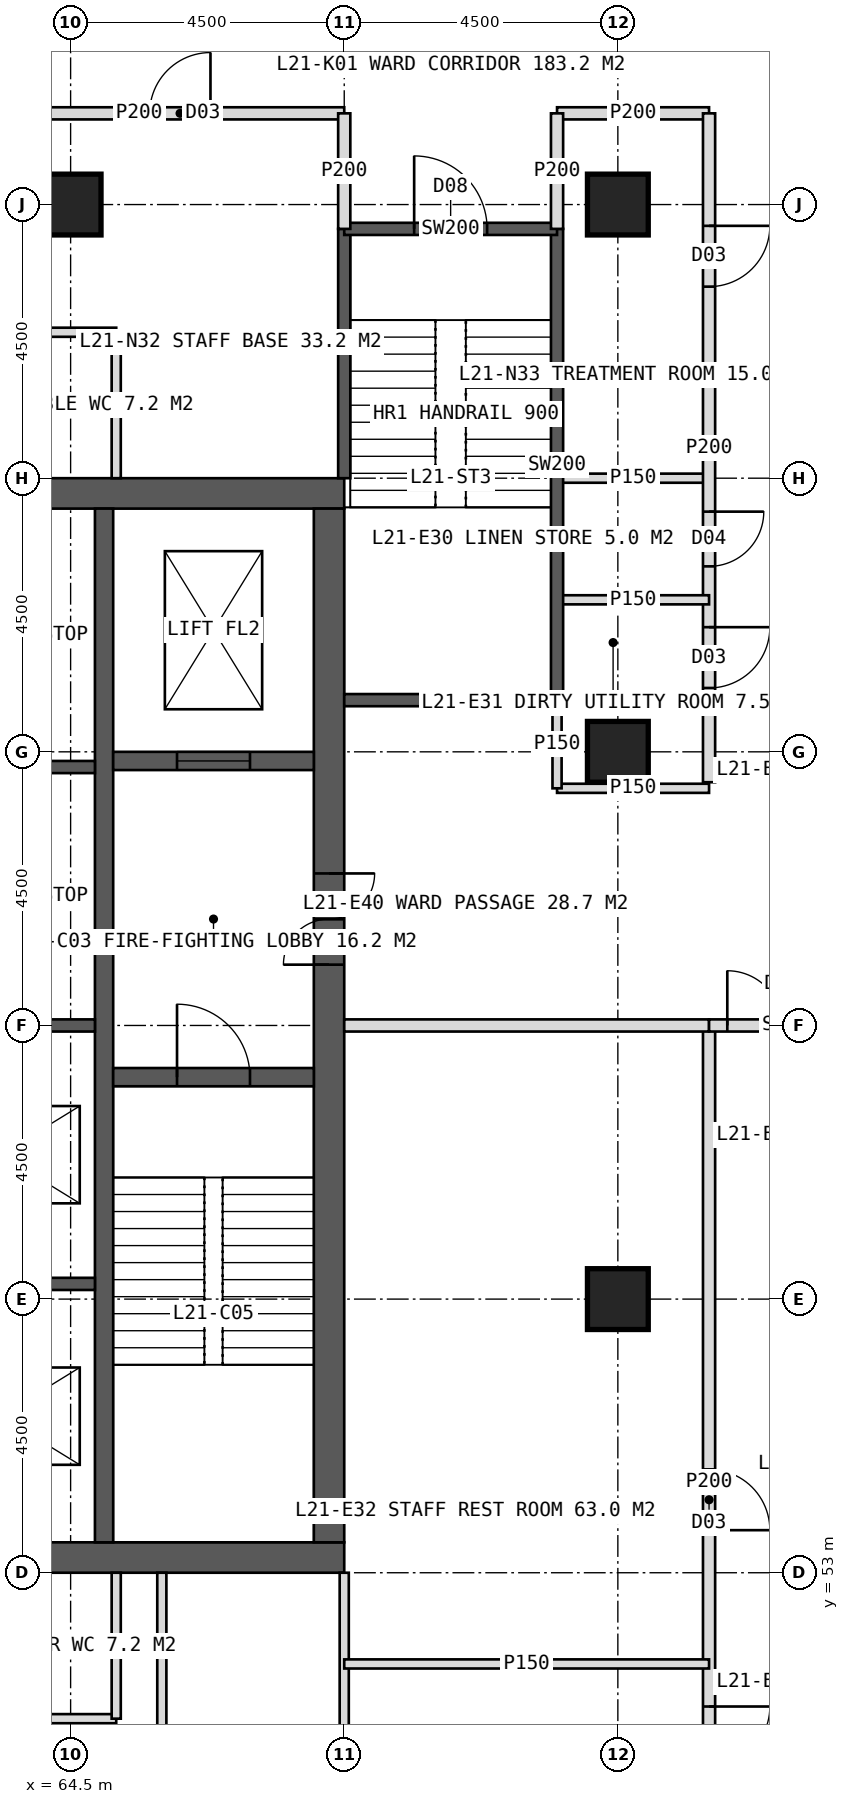
"""IFC4 building model, lengths in metres.
Left out: names, types, materials, properties, quantities, classifications, styles, units other than length and angle.
Written with IfcOpenShell. Run it as: python <this file> out.ifc"""

import sys

from ifc_helpers import new_model, si_unit, direction, frame, frame_2d, origin, origin_2d, place, context, subcontext, project, spatial, rectangle, hollow_rectangle, extrude, element, fill, save


model = new_model("IFC4")
c1 = context("Model", 3, precision=1e-05, world=origin(), true_north=direction((0.0, 1.0)))
c2 = subcontext(c1, "Body", "Model", "MODEL_VIEW")
j1 = project(units=[si_unit("LENGTHUNIT", "METRE"), si_unit("PLANEANGLEUNIT", "RADIAN")], contexts=[c1])
p1 = place(None, origin())
s1 = spatial("IfcSite", under=j1, at=p1, CompositionType="ELEMENT")
p2 = place(p1, origin())
s2 = spatial("IfcBuilding", under=s1, at=p2, CompositionType="ELEMENT")
p3 = place(p2, frame((0.0, 0.0, 91.0)))
s3 = spatial("IfcBuildingStorey", under=s2, at=p3, CompositionType="ELEMENT", Elevation=91.0)
p4 = place(p3, frame((51.0, 70.75, 0.0), z_axis=(0.0, 0.0, 1.0), x_axis=(1.0, 0.0, 0.0)))
e1 = element("IfcWall", 1, at=p4, inside=s3, PredefinedType="SHEAR", context=c2, shape_type="SweptSolid", body=[
    extrude(rectangle(XDim=18.0, YDim=0.5, at=frame_2d((9.0, 0.0))), origin(), (0.0, 0.0, 1.0), 4.0),
])
p5 = place(p4, frame((8.1, 0.0, 0.0)))
e2 = element("IfcOpeningElement", 2, at=p5, cuts=e1, PredefinedType="OPENING", context=c2, shape_type="SweptSolid", body=[
    extrude(rectangle(XDim=1.8, YDim=2.2, at=frame_2d((0.9, 1.1))), frame((0.0, 0.26, 0.0), z_axis=(0.0, -1.0, 0.0), x_axis=(1.0, 0.0, 0.0)), (0.0, 0.0, 1.0), 0.52),
])
p6 = place(p3, frame((51.0, 53.25, 0.0), z_axis=(0.0, 0.0, 1.0), x_axis=(1.0, 0.0, 0.0)))
e3 = element("IfcWall", 3, at=p6, inside=s3, PredefinedType="SHEAR", context=c2, shape_type="SweptSolid", body=[
    extrude(rectangle(XDim=18.0, YDim=0.5, at=frame_2d((9.0, 0.0))), origin(), (0.0, 0.0, 1.0), 4.0),
])
p7 = place(p6, frame((8.1, 0.0, 0.0)))
e4 = element("IfcOpeningElement", 4, at=p7, cuts=e3, PredefinedType="OPENING", context=c2, shape_type="SweptSolid", body=[
    extrude(rectangle(XDim=1.8, YDim=2.2, at=frame_2d((0.9, 1.1))), frame((0.0, 0.26, 0.0), z_axis=(0.0, -1.0, 0.0), x_axis=(1.0, 0.0, 0.0)), (0.0, 0.0, 1.0), 0.52),
])
p8 = place(p3, frame((68.75, 53.5, 0.0), z_axis=(0.0, 0.0, 1.0), x_axis=(0.0, 1.0, 0.0)))
e5 = element("IfcWall", 5, at=p8, inside=s3, PredefinedType="SHEAR", context=c2, shape_type="SweptSolid", body=[
    extrude(rectangle(XDim=17.0, YDim=0.5, at=frame_2d((8.5, 0.0))), origin(), (0.0, 0.0, 1.0), 4.0),
])
p9 = place(p8, frame((9.5, 0.0, 0.0)))
e6 = element("IfcOpeningElement", 6, at=p9, cuts=e5, PredefinedType="OPENING", context=c2, shape_type="SweptSolid", body=[
    extrude(rectangle(XDim=1.5, YDim=2.2, at=frame_2d((0.75, 1.1))), frame((0.0, 0.26, 0.0), z_axis=(0.0, -1.0, 0.0), x_axis=(1.0, 0.0, 0.0)), (0.0, 0.0, 1.0), 0.52),
])
p10 = place(p3, frame((65.05, 53.5, 0.0), z_axis=(0.0, 0.0, 1.0), x_axis=(0.0, 1.0, 0.0)))
e7 = element("IfcWall", 7, at=p10, inside=s3, PredefinedType="SHEAR", context=c2, shape_type="SweptSolid", body=[
    extrude(rectangle(XDim=17.0, YDim=0.3, at=frame_2d((8.5, 0.0))), origin(), (0.0, 0.0, 1.0), 4.0),
])
for number, where, z_axis, x_axis in (
    (8, (61.85, 57.75, 0.0), (0.0, 0.0, 1.0), (1.0, 0.0, 0.0)),
    (9, (61.85, 62.0, 0.0), (0.0, 0.0, 1.0), (1.0, 0.0, 0.0)),
    (10, (61.85, 66.25, 0.0), (0.0, 0.0, 1.0), (1.0, 0.0, 0.0)),
):
    element("IfcWall", number, at=place(p3, frame(where, z_axis=z_axis, x_axis=x_axis)), inside=s3, PredefinedType="SHEAR", context=c2, shape_type="SweptSolid", body=[
        extrude(rectangle(XDim=3.05, YDim=0.2, at=frame_2d((1.525, 0.0))), origin(), (0.0, 0.0, 1.0), 4.0),
    ])
p11 = place(p3, frame((65.2, 61.15, 0.0), z_axis=(0.0, 0.0, 1.0), x_axis=(1.0, 0.0, 0.0)))
e11 = element("IfcWall", 11, at=p11, inside=s3, PredefinedType="SHEAR", context=c2, shape_type="SweptSolid", body=[
    extrude(rectangle(XDim=3.3, YDim=0.3, at=frame_2d((1.65, 0.0))), origin(), (0.0, 0.0, 1.0), 4.0),
])
p12 = place(p11, frame((1.05, 0.0, 0.0)))
e12 = element("IfcOpeningElement", 12, at=p12, cuts=e11, PredefinedType="OPENING", context=c2, shape_type="SweptSolid", body=[
    extrude(rectangle(XDim=1.2, YDim=2.1, at=frame_2d((0.6, 1.05))), frame((0.0, 0.16, 0.0), z_axis=(0.0, -1.0, 0.0), x_axis=(1.0, 0.0, 0.0)), (0.0, 0.0, 1.0), 0.32),
])
p13 = place(p3, frame((65.2, 66.35, 0.0), z_axis=(0.0, 0.0, 1.0), x_axis=(1.0, 0.0, 0.0)))
e13 = element("IfcWall", 13, at=p13, inside=s3, PredefinedType="SHEAR", context=c2, shape_type="SweptSolid", body=[
    extrude(rectangle(XDim=3.3, YDim=0.3, at=frame_2d((1.65, 0.0))), origin(), (0.0, 0.0, 1.0), 4.0),
])
p14 = place(p13, frame((1.05, 0.0, 0.0)))
e14 = element("IfcOpeningElement", 14, at=p14, cuts=e13, PredefinedType="OPENING", context=c2, shape_type="SweptSolid", body=[
    extrude(rectangle(XDim=1.2, YDim=2.2, at=frame_2d((0.6, 1.1))), frame((0.0, 0.16, 0.0), z_axis=(0.0, -1.0, 0.0), x_axis=(1.0, 0.0, 0.0)), (0.0, 0.0, 1.0), 0.32),
])
for number, where, z_axis, x_axis in (
    (15, (73.5, 75.5, 0.0), (0.0, 0.0, 1.0), (1.0, 0.0, 0.0)),
    (16, (64.5, 75.5, 0.0), (0.0, 0.0, 1.0), (1.0, 0.0, 0.0)),
    (17, (73.5, 57.5, 0.0), (0.0, 0.0, 1.0), (1.0, 0.0, 0.0)),
    (18, (73.5, 66.5, 0.0), (0.0, 0.0, 1.0), (1.0, 0.0, 0.0)),
):
    element("IfcColumn", number, at=place(p3, frame(where, z_axis=z_axis, x_axis=x_axis)), inside=s3, PredefinedType="COLUMN", context=c2, shape_type="SweptSolid", body=[
        extrude(hollow_rectangle(XDim=1.0, YDim=1.0, WallThickness=0.1, at=origin_2d()), origin(), (0.0, 0.0, 1.0), 4.0),
    ])
p15 = place(p3, frame((62.25, 77.0, 0.0), z_axis=(0.0, 0.0, 1.0), x_axis=(1.0, 0.0, 0.0)))
e19 = element("IfcWall", 19, at=p15, inside=s3, PredefinedType="PARTITIONING", context=c2, shape_type="SweptSolid", body=[
    extrude(rectangle(XDim=6.75, YDim=0.2, at=frame_2d((3.375, 0.0))), origin(), (0.0, 0.0, 1.0), 3.75),
])
p16 = place(p15, frame((3.55, 0.0, 0.0)))
e20 = element("IfcOpeningElement", 20, at=p16, cuts=e19, PredefinedType="OPENING", context=c2, shape_type="SweptSolid", body=[
    extrude(rectangle(XDim=1.0, YDim=2.1, at=frame_2d((0.5, 1.05))), frame((0.0, 0.11, 0.0), z_axis=(0.0, -1.0, 0.0), x_axis=(1.0, 0.0, 0.0)), (0.0, 0.0, 1.0), 0.22),
])
p17 = place(p3, frame((72.5, 77.0, 0.0), z_axis=(0.0, 0.0, 1.0), x_axis=(1.0, 0.0, 0.0)))
e21 = element("IfcWall", 21, at=p17, inside=s3, PredefinedType="PARTITIONING", context=c2, shape_type="SweptSolid", body=[
    extrude(rectangle(XDim=2.5, YDim=0.2, at=frame_2d((1.25, 0.0))), origin(), (0.0, 0.0, 1.0), 3.75),
])
p18 = place(p3, frame((62.25, 73.4, 0.0), z_axis=(0.0, 0.0, 1.0), x_axis=(1.0, 0.0, 0.0)))
e22 = element("IfcWall", 22, at=p18, inside=s3, PredefinedType="PARTITIONING", context=c2, shape_type="SweptSolid", body=[
    extrude(rectangle(XDim=3.0, YDim=0.15, at=frame_2d((1.5, 0.0))), origin(), (0.0, 0.0, 1.0), 3.75),
])
p19 = place(p3, frame((65.25, 71.0, 0.0), z_axis=(0.0, 0.0, 1.0), x_axis=(0.0, 1.0, 0.0)))
e23 = element("IfcWall", 23, at=p19, inside=s3, PredefinedType="PARTITIONING", context=c2, shape_type="SweptSolid", body=[
    extrude(rectangle(XDim=2.4, YDim=0.15, at=frame_2d((1.2, 0.0))), origin(), (0.0, 0.0, 1.0), 3.75),
])
for number, where, z_axis, x_axis in (
    (24, (69.0, 53.0, 0.0), (0.0, 0.0, 1.0), (0.0, -1.0, 0.0)),
    (25, (66.0, 53.0, 0.0), (0.0, 0.0, 1.0), (0.0, -1.0, 0.0)),
):
    element("IfcWall", number, at=place(p3, frame(where, z_axis=z_axis, x_axis=x_axis)), inside=s3, PredefinedType="PARTITIONING", context=c2, shape_type="SweptSolid", body=[
        extrude(rectangle(XDim=6.0, YDim=0.15, at=frame_2d((3.0, 0.0))), origin(), (0.0, 0.0, 1.0), 3.75),
    ])
p20 = place(p3, frame((65.25, 50.6, 0.0), z_axis=(0.0, 0.0, 1.0), x_axis=(-1.0, 0.0, 0.0)))
e26 = element("IfcWall", 26, at=p20, inside=s3, PredefinedType="PARTITIONING", context=c2, shape_type="SweptSolid", body=[
    extrude(rectangle(XDim=3.0, YDim=0.15, at=frame_2d((1.5, 0.0))), origin(), (0.0, 0.0, 1.0), 3.75),
])
p21 = place(p3, frame((65.25, 53.0, 0.0), z_axis=(0.0, 0.0, 1.0), x_axis=(0.0, -1.0, 0.0)))
e27 = element("IfcWall", 27, at=p21, inside=s3, PredefinedType="PARTITIONING", context=c2, shape_type="SweptSolid", body=[
    extrude(rectangle(XDim=2.4, YDim=0.15, at=frame_2d((1.2, 0.0))), origin(), (0.0, 0.0, 1.0), 3.75),
])
p22 = place(p3, frame((72.5, 71.0, 0.0), z_axis=(0.0, 0.0, 1.0), x_axis=(1.0, 0.0, 0.0)))
e28 = element("IfcWall", 28, at=p22, inside=s3, PredefinedType="PARTITIONING", context=c2, shape_type="SweptSolid", body=[
    extrude(rectangle(XDim=2.5, YDim=0.15, at=frame_2d((1.25, 0.0))), origin(), (0.0, 0.0, 1.0), 3.75),
])
p23 = place(p3, frame((75.0, 77.0, 0.0), z_axis=(0.0, 0.0, 1.0), x_axis=(0.0, -1.0, 0.0)))
e29 = element("IfcWall", 29, at=p23, inside=s3, PredefinedType="PARTITIONING", context=c2, shape_type="SweptSolid", body=[
    extrude(rectangle(XDim=11.0, YDim=0.2, at=frame_2d((5.5, 0.0))), origin(), (0.0, 0.0, 1.0), 3.75),
])
p24 = place(p23, frame((1.85, 0.0, 0.0)))
e30 = element("IfcOpeningElement", 30, at=p24, cuts=e29, PredefinedType="OPENING", context=c2, shape_type="SweptSolid", body=[
    extrude(rectangle(XDim=1.0, YDim=2.1, at=frame_2d((0.5, 1.05))), frame((0.0, 0.11, 0.0), z_axis=(0.0, -1.0, 0.0), x_axis=(1.0, 0.0, 0.0)), (0.0, 0.0, 1.0), 0.22),
])
p25 = place(p23, frame((6.55, 0.0, 0.0)))
e31 = element("IfcOpeningElement", 31, at=p25, cuts=e29, PredefinedType="OPENING", context=c2, shape_type="SweptSolid", body=[
    extrude(rectangle(XDim=0.9, YDim=2.1, at=frame_2d((0.45, 1.05))), frame((0.0, 0.11, 0.0), z_axis=(0.0, -1.0, 0.0), x_axis=(1.0, 0.0, 0.0)), (0.0, 0.0, 1.0), 0.22),
])
p26 = place(p23, frame((8.45, 0.0, 0.0)))
e32 = element("IfcOpeningElement", 32, at=p26, cuts=e29, PredefinedType="OPENING", context=c2, shape_type="SweptSolid", body=[
    extrude(rectangle(XDim=1.0, YDim=2.1, at=frame_2d((0.5, 1.05))), frame((0.0, 0.11, 0.0), z_axis=(0.0, -1.0, 0.0), x_axis=(1.0, 0.0, 0.0)), (0.0, 0.0, 1.0), 0.22),
])
p27 = place(p3, frame((75.0, 62.0, 0.0), z_axis=(0.0, 0.0, 1.0), x_axis=(0.0, -1.0, 0.0)))
e33 = element("IfcWall", 33, at=p27, inside=s3, PredefinedType="PARTITIONING", context=c2, shape_type="SweptSolid", body=[
    extrude(rectangle(XDim=15.0, YDim=0.2, at=frame_2d((7.5, 0.0))), origin(), (0.0, 0.0, 1.0), 3.75),
])
p28 = place(p27, frame((7.3, 0.0, 0.0)))
e34 = element("IfcOpeningElement", 34, at=p28, cuts=e33, PredefinedType="OPENING", context=c2, shape_type="SweptSolid", body=[
    extrude(rectangle(XDim=1.0, YDim=2.1, at=frame_2d((0.5, 1.05))), frame((0.0, 0.11, 0.0), z_axis=(0.0, -1.0, 0.0), x_axis=(1.0, 0.0, 0.0)), (0.0, 0.0, 1.0), 0.22),
])
p29 = place(p27, frame((11.2, 0.0, 0.0)))
e35 = element("IfcOpeningElement", 35, at=p29, cuts=e33, PredefinedType="OPENING", context=c2, shape_type="SweptSolid", body=[
    extrude(rectangle(XDim=1.0, YDim=2.1, at=frame_2d((0.5, 1.05))), frame((0.0, 0.11, 0.0), z_axis=(0.0, -1.0, 0.0), x_axis=(1.0, 0.0, 0.0)), (0.0, 0.0, 1.0), 0.22),
])
p30 = place(p3, frame((72.5, 65.9, 0.0), z_axis=(0.0, 0.0, 1.0), x_axis=(1.0, 0.0, 0.0)))
e36 = element("IfcWall", 36, at=p30, inside=s3, PredefinedType="PARTITIONING", context=c2, shape_type="SweptSolid", body=[
    extrude(rectangle(XDim=2.5, YDim=0.15, at=frame_2d((1.25, 0.0))), origin(), (0.0, 0.0, 1.0), 3.75),
])
p31 = place(p3, frame((69.0, 62.0, 0.0), z_axis=(0.0, 0.0, 1.0), x_axis=(1.0, 0.0, 0.0)))
e37 = element("IfcWall", 37, at=p31, inside=s3, PredefinedType="SOLIDWALL", context=c2, shape_type="SweptSolid", body=[
    extrude(rectangle(XDim=6.0, YDim=0.2, at=frame_2d((3.0, 0.0))), origin(), (0.0, 0.0, 1.0), 2.75),
])
p32 = place(p3, frame((72.5, 69.0, 0.0), z_axis=(0.0, 0.0, 1.0), x_axis=(1.0, 0.0, 0.0)))
e38 = element("IfcWall", 38, at=p32, inside=s3, PredefinedType="PARTITIONING", context=c2, shape_type="SweptSolid", body=[
    extrude(rectangle(XDim=2.5, YDim=0.15, at=frame_2d((1.25, 0.0))), origin(), (0.0, 0.0, 1.0), 3.75),
])
p33 = place(p3, frame((69.0, 51.5, 0.0), z_axis=(0.0, 0.0, 1.0), x_axis=(1.0, 0.0, 0.0)))
e39 = element("IfcWall", 39, at=p33, inside=s3, PredefinedType="PARTITIONING", context=c2, shape_type="SweptSolid", body=[
    extrude(rectangle(XDim=6.0, YDim=0.15, at=frame_2d((3.0, 0.0))), origin(), (0.0, 0.0, 1.0), 3.75),
])
p34 = place(p3, frame((75.0, 62.0, 0.0), z_axis=(0.0, 0.0, 1.0), x_axis=(1.0, 0.0, 0.0)))
e40 = element("IfcWall", 40, at=p34, inside=s3, PredefinedType="SOLIDWALL", context=c2, shape_type="SweptSolid", body=[
    extrude(rectangle(XDim=2.7, YDim=0.2, at=frame_2d((1.35, 0.0))), origin(), (0.0, 0.0, 1.0), 2.75),
])
p35 = place(p34, frame((0.3, 0.0, 0.0)))
e41 = element("IfcOpeningElement", 41, at=p35, cuts=e40, PredefinedType="OPENING", context=c2, shape_type="SweptSolid", body=[
    extrude(rectangle(XDim=1.8, YDim=2.2, at=frame_2d((0.9, 1.1))), frame((0.0, 0.11, 0.0), z_axis=(0.0, -1.0, 0.0), x_axis=(1.0, 0.0, 0.0)), (0.0, 0.0, 1.0), 0.22),
])
p36 = place(p3, frame((72.5, 65.9, 0.0), z_axis=(0.0, 0.0, 1.0), x_axis=(0.0, 1.0, 0.0)))
e42 = element("IfcWall", 42, at=p36, inside=s3, PredefinedType="PARTITIONING", context=c2, shape_type="SweptSolid", body=[
    extrude(rectangle(XDim=1.45, YDim=0.15, at=frame_2d((0.725, 0.0))), origin(), (0.0, 0.0, 1.0), 3.75),
])
p37 = place(p3, frame((69.0, 71.0, 0.0), z_axis=(0.0, 0.0, 1.0), x_axis=(0.0, 1.0, 0.0)))
e43 = element("IfcWall", 43, at=p37, inside=s3, PredefinedType="SOLIDWALL", context=c2, shape_type="SweptSolid", body=[
    extrude(rectangle(XDim=4.1, YDim=0.2, at=frame_2d((2.05, 0.0))), origin(), (0.0, 0.0, 1.0), 3.75),
])
p38 = place(p3, frame((69.0, 67.35, 0.0), z_axis=(0.0, 0.0, 1.0), x_axis=(1.0, 0.0, 0.0)))
e44 = element("IfcWall", 44, at=p38, inside=s3, PredefinedType="SOLIDWALL", context=c2, shape_type="SweptSolid", body=[
    extrude(rectangle(XDim=3.5, YDim=0.2, at=frame_2d((1.75, 0.0))), origin(), (0.0, 0.0, 1.0), 3.75),
])
p39 = place(p3, frame((72.5, 67.35, 0.0), z_axis=(0.0, 0.0, 1.0), x_axis=(0.0, 1.0, 0.0)))
e45 = element("IfcWall", 45, at=p39, inside=s3, PredefinedType="SOLIDWALL", context=c2, shape_type="SweptSolid", body=[
    extrude(rectangle(XDim=7.75, YDim=0.2, at=frame_2d((3.875, 0.0))), origin(), (0.0, 0.0, 1.0), 3.75),
])
p40 = place(p3, frame((69.0, 75.1, 0.0), z_axis=(0.0, 0.0, 1.0), x_axis=(1.0, 0.0, 0.0)))
e46 = element("IfcWall", 46, at=p40, inside=s3, PredefinedType="SOLIDWALL", context=c2, shape_type="SweptSolid", body=[
    extrude(rectangle(XDim=3.5, YDim=0.2, at=frame_2d((1.75, 0.0))), origin(), (0.0, 0.0, 1.0), 3.75),
])
p41 = place(p40, frame((1.15, 0.0, 0.0)))
e47 = element("IfcOpeningElement", 47, at=p41, cuts=e46, PredefinedType="OPENING", context=c2, shape_type="SweptSolid", body=[
    extrude(rectangle(XDim=1.2, YDim=2.1, at=frame_2d((0.6, 1.05))), frame((0.0, 0.11, 0.0), z_axis=(0.0, -1.0, 0.0), x_axis=(1.0, 0.0, 0.0)), (0.0, 0.0, 1.0), 0.22),
])
for number, where, z_axis, x_axis in (
    (48, (69.0, 75.1, 0.0), (0.0, 0.0, 1.0), (0.0, 1.0, 0.0)),
    (49, (72.5, 75.1, 0.0), (0.0, 0.0, 1.0), (0.0, 1.0, 0.0)),
):
    element("IfcWall", number, at=place(p3, frame(where, z_axis=z_axis, x_axis=x_axis)), inside=s3, PredefinedType="PARTITIONING", context=c2, shape_type="SweptSolid", body=[
        extrude(rectangle(XDim=1.9, YDim=0.2, at=frame_2d((0.95, 0.0))), origin(), (0.0, 0.0, 1.0), 3.75),
    ])
p42 = place(p16, origin())
e50 = element("IfcDoor", 50, at=p42, inside=s3, OperationType="SINGLE_SWING_RIGHT", PredefinedType="DOOR", context=c2, shape_type="SweptSolid", body=[
    extrude(rectangle(XDim=1.0, YDim=2.1, at=frame_2d((0.5, 1.05))), frame((0.0, 0.025, 0.0), z_axis=(0.0, -1.0, 0.0), x_axis=(1.0, 0.0, 0.0)), (0.0, 0.0, 1.0), 0.05),
])
fill(e20, e50)
p43 = place(p24, origin())
e51 = element("IfcDoor", 51, at=p43, inside=s3, OperationType="SINGLE_SWING_LEFT", PredefinedType="DOOR", context=c2, shape_type="SweptSolid", body=[
    extrude(rectangle(XDim=1.0, YDim=2.1, at=frame_2d((0.5, 1.05))), frame((0.0, 0.025, 0.0), z_axis=(0.0, -1.0, 0.0), x_axis=(1.0, 0.0, 0.0)), (0.0, 0.0, 1.0), 0.05),
])
fill(e30, e51)
p44 = place(p25, origin())
e52 = element("IfcDoor", 52, at=p44, inside=s3, OperationType="SINGLE_SWING_LEFT", PredefinedType="DOOR", context=c2, shape_type="SweptSolid", body=[
    extrude(rectangle(XDim=0.9, YDim=2.1, at=frame_2d((0.45, 1.05))), frame((0.0, 0.025, 0.0), z_axis=(0.0, -1.0, 0.0), x_axis=(1.0, 0.0, 0.0)), (0.0, 0.0, 1.0), 0.05),
])
fill(e31, e52)
p45 = place(p26, origin())
e53 = element("IfcDoor", 53, at=p45, inside=s3, OperationType="SINGLE_SWING_LEFT", PredefinedType="DOOR", context=c2, shape_type="SweptSolid", body=[
    extrude(rectangle(XDim=1.0, YDim=2.1, at=frame_2d((0.5, 1.05))), frame((0.0, 0.025, 0.0), z_axis=(0.0, -1.0, 0.0), x_axis=(1.0, 0.0, 0.0)), (0.0, 0.0, 1.0), 0.05),
])
fill(e32, e53)
p46 = place(p28, origin())
e54 = element("IfcDoor", 54, at=p46, inside=s3, OperationType="SINGLE_SWING_RIGHT", PredefinedType="DOOR", context=c2, shape_type="SweptSolid", body=[
    extrude(rectangle(XDim=1.0, YDim=2.1, at=frame_2d((0.5, 1.05))), frame((0.0, 0.025, 0.0), z_axis=(0.0, -1.0, 0.0), x_axis=(1.0, 0.0, 0.0)), (0.0, 0.0, 1.0), 0.05),
])
fill(e34, e54)
p47 = place(p29, origin())
e55 = element("IfcDoor", 55, at=p47, inside=s3, OperationType="SINGLE_SWING_LEFT", PredefinedType="DOOR", context=c2, shape_type="SweptSolid", body=[
    extrude(rectangle(XDim=1.0, YDim=2.1, at=frame_2d((0.5, 1.05))), frame((0.0, 0.025, 0.0), z_axis=(0.0, -1.0, 0.0), x_axis=(1.0, 0.0, 0.0)), (0.0, 0.0, 1.0), 0.05),
])
fill(e35, e55)
p48 = place(p35, origin())
e56 = element("IfcDoor", 56, at=p48, inside=s3, OperationType="DOUBLE_DOOR_DOUBLE_SWING", PredefinedType="DOOR", context=c2, shape_type="SweptSolid", body=[
    extrude(rectangle(XDim=1.8, YDim=2.2, at=frame_2d((0.9, 1.1))), frame((0.0, 0.025, 0.0), z_axis=(0.0, -1.0, 0.0), x_axis=(1.0, 0.0, 0.0)), (0.0, 0.0, 1.0), 0.05),
])
fill(e41, e56)
p49 = place(p9, origin())
e57 = element("IfcDoor", 57, at=p49, inside=s3, OperationType="DOUBLE_DOOR_SINGLE_SWING", PredefinedType="DOOR", context=c2, shape_type="SweptSolid", body=[
    extrude(rectangle(XDim=1.5, YDim=2.2, at=frame_2d((0.75, 1.1))), frame((0.0, 0.025, 0.0), z_axis=(0.0, -1.0, 0.0), x_axis=(1.0, 0.0, 0.0)), (0.0, 0.0, 1.0), 0.05),
])
fill(e6, e57)
p50 = place(p12, origin())
e58 = element("IfcDoor", 58, at=p50, inside=s3, OperationType="SINGLE_SWING_LEFT", PredefinedType="DOOR", context=c2, shape_type="SweptSolid", body=[
    extrude(rectangle(XDim=1.2, YDim=2.1, at=frame_2d((0.6, 1.05))), frame((0.0, 0.025, 0.0), z_axis=(0.0, -1.0, 0.0), x_axis=(1.0, 0.0, 0.0)), (0.0, 0.0, 1.0), 0.05),
])
fill(e12, e58)
p51 = place(p14, origin())
e59 = element("IfcDoor", 59, at=p51, inside=s3, OperationType="SLIDING_TO_LEFT", PredefinedType="DOOR", context=c2, shape_type="SweptSolid", body=[
    extrude(rectangle(XDim=1.2, YDim=2.2, at=frame_2d((0.6, 1.1))), frame((0.0, 0.025, 0.0), z_axis=(0.0, -1.0, 0.0), x_axis=(1.0, 0.0, 0.0)), (0.0, 0.0, 1.0), 0.05),
])
fill(e14, e59)
p52 = place(p41, origin())
e60 = element("IfcDoor", 60, at=p52, inside=s3, OperationType="SINGLE_SWING_LEFT", PredefinedType="DOOR", context=c2, shape_type="SweptSolid", body=[
    extrude(rectangle(XDim=1.2, YDim=2.1, at=frame_2d((0.6, 1.05))), frame((0.0, 0.025, 0.0), z_axis=(0.0, -1.0, 0.0), x_axis=(1.0, 0.0, 0.0)), (0.0, 0.0, 1.0), 0.05),
])
fill(e47, e60)
save(model, sys.argv[1])
